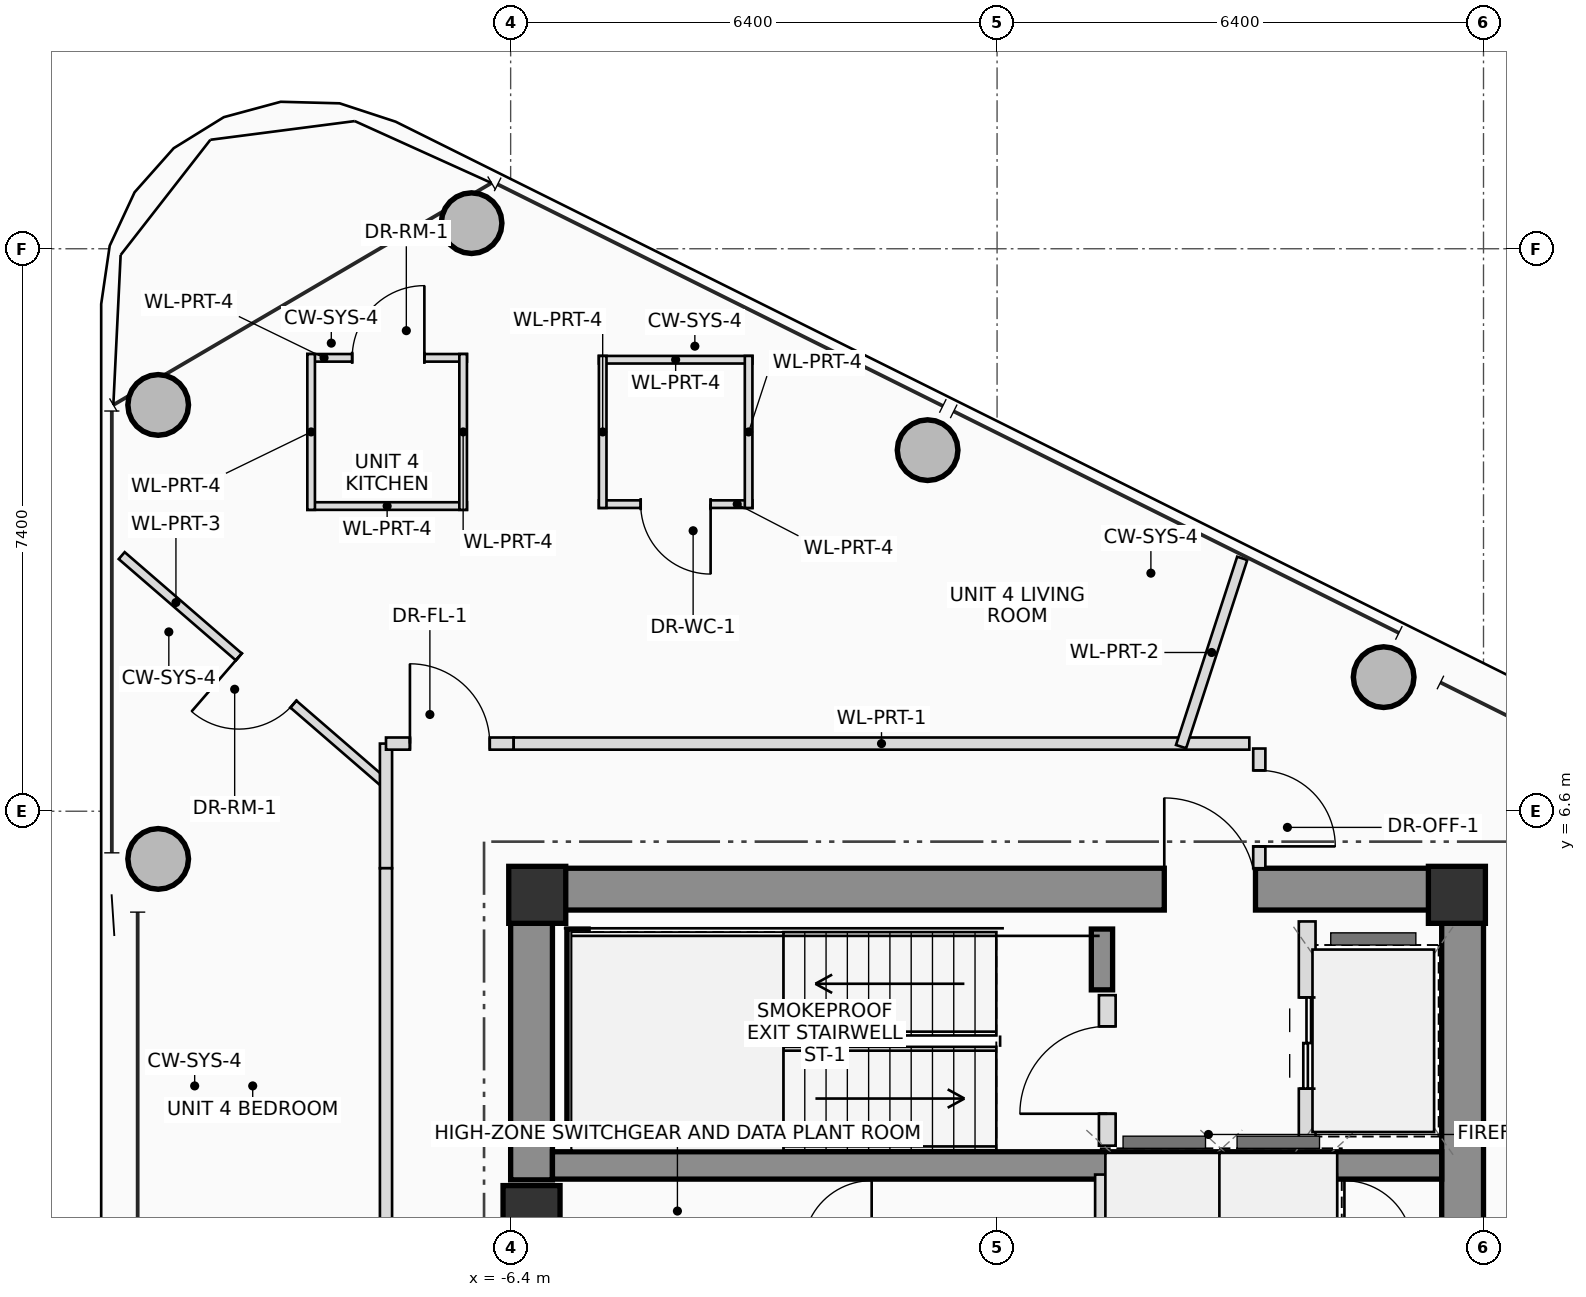
"""IFC4 building model, lengths in metres.
Left out: names, types, materials, properties, quantities, classifications, styles, units other than length and angle.
Written with IfcOpenShell. Run it as: python <this file> out.ifc"""

import sys

from ifc_helpers import new_model, si_unit, direction, frame, frame_2d, origin, origin_2d, place, context, subcontext, project, spatial, rectangle, hollow_circle, extrude, source, transform, mapped, element, fill, save


model = new_model("IFC4")
c1 = context("Model", 3, precision=1e-05, world=origin(), true_north=direction((0.0, 1.0)))
c2 = subcontext(c1, "Body", "Model", "MODEL_VIEW")
j1 = project(units=[si_unit("LENGTHUNIT", "METRE"), si_unit("PLANEANGLEUNIT", "RADIAN")], contexts=[c1])
p1 = place(None, origin())
s1 = spatial("IfcSite", under=j1, at=p1, CompositionType="ELEMENT")
p2 = place(p1, origin())
s2 = spatial("IfcBuilding", under=s1, at=p2, CompositionType="ELEMENT")
p3 = place(p2, frame((0.0, 0.0, 300.2)))
s3 = spatial("IfcBuildingStorey", under=s2, at=p3, CompositionType="ELEMENT", Elevation=300.2)
m1 = source(origin(), c2, "Body", "SweptSolid", [
    extrude(rectangle(XDim=0.75, YDim=0.75, at=origin_2d()), origin(), (0.0, 0.0, 1.0), 3.45),
])
for number, where, z_axis, x_axis in (
    (1, (6.05, 5.5, 0.0), (0.0, 0.0, 1.0), (1.0, 0.0, 0.0)),
    (2, (-6.05, 5.5, 0.0), (0.0, 0.0, 1.0), (1.0, 0.0, 0.0)),
):
    element("IfcColumn", number, at=place(p3, frame(where, z_axis=z_axis, x_axis=x_axis)), inside=s3, PredefinedType="COLUMN", context=c2, shape_type="MappedRepresentation", body=[
        mapped(m1, transform((0.0, 0.0, 0.0), scale=1.0)),
    ])
p4 = place(p3, frame((-6.4, 5.575, 0.0), z_axis=(0.0, 0.0, 1.0), x_axis=(1.0, 0.0, 0.0)))
e3 = element("IfcWall", 3, at=p4, inside=s3, PredefinedType="SHEAR", context=c2, shape_type="SweptSolid", body=[
    extrude(rectangle(XDim=12.8, YDim=0.55, at=frame_2d((6.4, 0.0))), origin(), (0.0, 0.0, 1.0), 3.45),
])
p5 = place(p4, frame((8.6, 0.0, 0.0)))
e4 = element("IfcOpeningElement", 4, at=p5, cuts=e3, PredefinedType="OPENING", context=c2, shape_type="SweptSolid", body=[
    extrude(rectangle(XDim=1.2, YDim=2.2, at=frame_2d((0.6, 1.1))), frame((0.0, 0.285, 0.0), z_axis=(0.0, -1.0, 0.0), x_axis=(1.0, 0.0, 0.0)), (0.0, 0.0, 1.0), 0.57),
])
p6 = place(p3, frame((6.125, -5.3, 0.0), z_axis=(0.0, 0.0, 1.0), x_axis=(0.0, 1.0, 0.0)))
e5 = element("IfcWall", 5, at=p6, inside=s3, PredefinedType="SHEAR", context=c2, shape_type="SweptSolid", body=[
    extrude(rectangle(XDim=10.6, YDim=0.55, at=frame_2d((5.3, 0.0))), origin(), (0.0, 0.0, 1.0), 3.45),
])
p7 = place(p3, frame((-6.125, 1.75, 0.0), z_axis=(0.0, 0.0, 1.0), x_axis=(0.0, 1.0, 0.0)))
e6 = element("IfcWall", 6, at=p7, inside=s3, PredefinedType="SHEAR", context=c2, shape_type="SweptSolid", body=[
    extrude(rectangle(XDim=3.55, YDim=0.55, at=frame_2d((1.775, 0.0))), origin(), (0.0, 0.0, 1.0), 3.45),
])
p8 = place(p3, frame((-5.85, 1.94, 0.0), z_axis=(0.0, 0.0, 1.0), x_axis=(1.0, 0.0, 0.0)))
e7 = element("IfcWall", 7, at=p8, inside=s3, PredefinedType="SHEAR", context=c2, shape_type="SweptSolid", body=[
    extrude(rectangle(XDim=11.7, YDim=0.36, at=frame_2d((5.85, 0.0))), origin(), (0.0, 0.0, 1.0), 3.45),
])
p9 = place(p3, frame((-5.52, 2.3, 0.0), z_axis=(0.0, 0.0, 1.0), x_axis=(0.0, 1.0, 0.0)))
e8 = element("IfcWall", 8, at=p9, inside=s3, PredefinedType="SHEAR", context=c2, shape_type="SweptSolid", body=[
    extrude(rectangle(XDim=2.75, YDim=0.28, at=frame_2d((1.375, 0.0))), origin(), (0.0, 0.0, 1.0), 3.45),
])
p10 = place(p3, frame((1.38, 4.25, 0.0), z_axis=(0.0, 0.0, 1.0), x_axis=(0.0, 1.0, 0.0)))
e9 = element("IfcWall", 9, at=p10, inside=s3, PredefinedType="SHEAR", context=c2, shape_type="SweptSolid", body=[
    extrude(rectangle(XDim=0.8, YDim=0.28, at=frame_2d((0.4, 0.0))), origin(), (0.0, 0.0, 1.0), 3.45),
])
p11 = place(p3, frame((-6.125, 1.3, 0.0), z_axis=(0.0, 0.0, 1.0), x_axis=(1.0, 0.0, 0.0)))
e10 = element("IfcColumn", 10, at=p11, inside=s3, PredefinedType="COLUMN", context=c2, shape_type="MappedRepresentation", body=[
    mapped(m1, transform((0.0, 0.0, 0.0), scale=1.0)),
])
m2 = source(origin(), c2, "Body", "SweptSolid", [
    extrude(hollow_circle(Radius=0.4, WallThickness=0.028, at=origin_2d()), origin(), (0.0, 0.0, 1.0), 3.45),
])
for number, where, z_axis, x_axis in (
    (11, (5.086, 8.364, 0.0), (0.0, 0.0, 1.0), (1.0, 0.0, 0.0)),
    (12, (-0.914, 11.35, 0.0), (0.0, 0.0, 1.0), (1.0, 0.0, 0.0)),
    (13, (-6.914, 14.337, 0.0), (0.0, 0.0, 1.0), (1.0, 0.0, 0.0)),
    (14, (-11.037, 11.945, 0.0), (0.0, 0.0, 1.0), (1.0, 0.0, 0.0)),
    (15, (-11.037, 5.973, 0.0), (0.0, 0.0, 1.0), (1.0, 0.0, 0.0)),
):
    element("IfcColumn", number, at=place(p3, frame(where, z_axis=z_axis, x_axis=x_axis)), inside=s3, PredefinedType="COLUMN", context=c2, shape_type="MappedRepresentation", body=[
        mapped(m2, transform((0.0, 0.0, 0.0), scale=1.0)),
    ])
p12 = place(p3, frame((1.45, 2.2, 0.0), z_axis=(0.0, 0.0, 1.0), x_axis=(0.0, 1.0, 0.0)))
e16 = element("IfcWall", 16, at=p12, inside=s3, PredefinedType="PLUMBINGWALL", context=c2, shape_type="SweptSolid", body=[
    extrude(rectangle(XDim=1.98, YDim=0.22, at=frame_2d((0.99, 0.0))), origin(), (0.0, 0.0, 1.0), 3.25),
])
p13 = place(p12, frame((0.42, 0.0, 0.0)))
e17 = element("IfcOpeningElement", 17, at=p13, cuts=e16, PredefinedType="OPENING", context=c2, shape_type="SweptSolid", body=[
    extrude(rectangle(XDim=1.15, YDim=2.15, at=frame_2d((0.575, 1.075))), frame((0.0, 0.12, 0.0), z_axis=(0.0, -1.0, 0.0), x_axis=(1.0, 0.0, 0.0)), (0.0, 0.0, 1.0), 0.24),
])
p14 = place(p3, frame((4.08, 2.2, 0.0), z_axis=(0.0, 0.0, 1.0), x_axis=(0.0, 1.0, 0.0)))
e18 = element("IfcWall", 18, at=p14, inside=s3, PredefinedType="PLUMBINGWALL", context=c2, shape_type="SweptSolid", body=[
    extrude(rectangle(XDim=2.95, YDim=0.22, at=frame_2d((1.475, 0.0))), origin(), (0.0, 0.0, 1.0), 3.25),
])
p15 = place(p14, frame((0.75, 0.0, 0.0)))
e19 = element("IfcOpeningElement", 19, at=p15, cuts=e18, PredefinedType="OPENING", context=c2, shape_type="SweptSolid", body=[
    extrude(rectangle(XDim=1.2, YDim=2.25, at=frame_2d((0.6, 1.125))), frame((0.0, 0.12, 0.0), z_axis=(0.0, -1.0, 0.0), x_axis=(1.0, 0.0, 0.0)), (0.0, 0.0, 1.0), 0.24),
])
for number, where, z_axis, x_axis in (
    (20, (1.38, 0.84, 0.0), (0.0, 0.0, 1.0), (0.0, 1.0, 0.0)),
    (21, (3.02, 0.84, 0.0), (0.0, 0.0, 1.0), (0.0, 1.0, 0.0)),
    (22, (4.38, 0.84, 0.0), (0.0, 0.0, 1.0), (0.0, 1.0, 0.0)),
):
    element("IfcWall", number, at=place(p3, frame(where, z_axis=z_axis, x_axis=x_axis)), inside=s3, PredefinedType="PLUMBINGWALL", context=c2, shape_type="SweptSolid", body=[
        extrude(rectangle(XDim=0.98, YDim=0.18, at=frame_2d((0.49, 0.0))), origin(), (0.0, 0.0, 1.0), 3.25),
    ])
p16 = place(p3, frame((-8.07, 6.981, 0.0), z_axis=(0.0, 0.0, 1.0), x_axis=(-0.756280799409, 0.654247164644, 0.0)))
e23 = element("IfcWall", 23, at=p16, inside=s3, PredefinedType="PARTITIONING", context=c2, shape_type="SweptSolid", body=[
    extrude(rectangle(XDim=4.558, YDim=0.12, at=frame_2d((2.279, 0.0))), origin(), (0.0, 0.0, 1.0), 2.815),
])
p17 = place(p16, frame((1.571, 0.0, 0.0)))
e24 = element("IfcOpeningElement", 24, at=p17, cuts=e23, PredefinedType="OPENING", context=c2, shape_type="SweptSolid", body=[
    extrude(rectangle(XDim=0.95, YDim=2.1, at=frame_2d((0.475, 1.05))), frame((0.0, 0.07, 0.0), z_axis=(0.0, -1.0, 0.0), x_axis=(1.0, 0.0, 0.0)), (0.0, 0.0, 1.0), 0.14),
])
p18 = place(p3, frame((-5.239, 12.54, 0.0), z_axis=(0.0, 0.0, 1.0), x_axis=(1.0, 0.0, 0.0)))
e25 = element("IfcWall", 25, at=p18, inside=s3, PredefinedType="PARTITIONING", context=c2, shape_type="SweptSolid", body=[
    extrude(rectangle(XDim=2.02, YDim=0.1, at=frame_2d((1.01, 0.0))), origin(), (0.0, 0.0, 1.0), 2.815),
])
p19 = place(p3, frame((-3.219, 10.64, 0.0), z_axis=(0.0, 0.0, 1.0), x_axis=(-1.0, 0.0, 0.0)))
e26 = element("IfcWall", 26, at=p19, inside=s3, PredefinedType="PARTITIONING", context=c2, shape_type="SweptSolid", body=[
    extrude(rectangle(XDim=2.02, YDim=0.1, at=frame_2d((1.01, 0.0))), origin(), (0.0, 0.0, 1.0), 2.905),
])
p20 = place(p19, frame((0.55, 0.0, 0.0)))
e27 = element("IfcOpeningElement", 27, at=p20, cuts=e26, PredefinedType="OPENING", context=c2, shape_type="SweptSolid", body=[
    extrude(rectangle(XDim=0.92, YDim=2.1, at=frame_2d((0.46, 1.05))), frame((0.0, 0.06, 0.0), z_axis=(0.0, -1.0, 0.0), x_axis=(1.0, 0.0, 0.0)), (0.0, 0.0, 1.0), 0.12),
])
p21 = place(p3, frame((-3.269, 12.59, 0.0), z_axis=(0.0, 0.0, 1.0), x_axis=(0.0, -1.0, 0.0)))
e28 = element("IfcWall", 28, at=p21, inside=s3, PredefinedType="PARTITIONING", context=c2, shape_type="SweptSolid", body=[
    extrude(rectangle(XDim=2.0, YDim=0.1, at=frame_2d((1.0, 0.0))), origin(), (0.0, 0.0, 1.0), 2.815),
])
p22 = place(p3, frame((-5.189, 10.59, 0.0), z_axis=(0.0, 0.0, 1.0), x_axis=(0.0, 1.0, 0.0)))
e29 = element("IfcWall", 29, at=p22, inside=s3, PredefinedType="PARTITIONING", context=c2, shape_type="SweptSolid", body=[
    extrude(rectangle(XDim=2.0, YDim=0.1, at=frame_2d((1.0, 0.0))), origin(), (0.0, 0.0, 1.0), 2.905),
])
p23 = place(p3, frame((-9.075, 12.565, 0.0), z_axis=(0.0, 0.0, 1.0), x_axis=(1.0, 0.0, 0.0)))
e30 = element("IfcWall", 30, at=p23, inside=s3, PredefinedType="PARTITIONING", context=c2, shape_type="SweptSolid", body=[
    extrude(rectangle(XDim=2.1, YDim=0.1, at=frame_2d((1.05, 0.0))), origin(), (0.0, 0.0, 1.0), 3.25),
])
p24 = place(p23, frame((0.59, 0.0, 0.0)))
e31 = element("IfcOpeningElement", 31, at=p24, cuts=e30, PredefinedType="OPENING", context=c2, shape_type="SweptSolid", body=[
    extrude(rectangle(XDim=0.95, YDim=2.1, at=frame_2d((0.475, 1.05))), frame((0.0, 0.06, 0.0), z_axis=(0.0, -1.0, 0.0), x_axis=(1.0, 0.0, 0.0)), (0.0, 0.0, 1.0), 0.12),
])
p25 = place(p3, frame((-6.975, 10.615, 0.0), z_axis=(0.0, 0.0, 1.0), x_axis=(-1.0, 0.0, 0.0)))
e32 = element("IfcWall", 32, at=p25, inside=s3, PredefinedType="PARTITIONING", context=c2, shape_type="SweptSolid", body=[
    extrude(rectangle(XDim=2.1, YDim=0.1, at=frame_2d((1.05, 0.0))), origin(), (0.0, 0.0, 1.0), 2.905),
])
p26 = place(p3, frame((-7.025, 12.615, 0.0), z_axis=(0.0, 0.0, 1.0), x_axis=(0.0, -1.0, 0.0)))
e33 = element("IfcWall", 33, at=p26, inside=s3, PredefinedType="PARTITIONING", context=c2, shape_type="SweptSolid", body=[
    extrude(rectangle(XDim=2.05, YDim=0.1, at=frame_2d((1.025, 0.0))), origin(), (0.0, 0.0, 1.0), 2.905),
])
p27 = place(p3, frame((-9.025, 10.565, 0.0), z_axis=(0.0, 0.0, 1.0), x_axis=(0.0, 1.0, 0.0)))
e34 = element("IfcWall", 34, at=p27, inside=s3, PredefinedType="PARTITIONING", context=c2, shape_type="SweptSolid", body=[
    extrude(rectangle(XDim=2.05, YDim=0.1, at=frame_2d((1.025, 0.0))), origin(), (0.0, 0.0, 1.0), 3.25),
])
p28 = place(p3, frame((-8.04, 5.85, 0.0), z_axis=(0.0, 0.0, 1.0), x_axis=(0.0, 1.0, 0.0)))
e35 = element("IfcWall", 35, at=p28, inside=s3, PredefinedType="PARTITIONING", context=c2, shape_type="SweptSolid", body=[
    extrude(rectangle(XDim=1.64, YDim=0.16, at=frame_2d((0.82, 0.0))), origin(), (0.0, 0.0, 1.0), 2.905),
])
p29 = place(p3, frame((-8.04, 7.49, 0.0), z_axis=(0.0, 0.0, 1.0), x_axis=(1.0, 0.0, 0.0)))
e36 = element("IfcWall", 36, at=p29, inside=s3, PredefinedType="PARTITIONING", context=c2, shape_type="SweptSolid", body=[
    extrude(rectangle(XDim=1.68, YDim=0.16, at=frame_2d((0.84, 0.0))), origin(), (0.0, 0.0, 1.0), 2.655),
])
p30 = place(p29, frame((0.315, 0.0, 0.0)))
e37 = element("IfcOpeningElement", 37, at=p30, cuts=e36, PredefinedType="OPENING", context=c2, shape_type="SweptSolid", body=[
    extrude(rectangle(XDim=1.05, YDim=2.2, at=frame_2d((0.525, 1.1))), frame((0.0, 0.09, 0.0), z_axis=(0.0, -1.0, 0.0), x_axis=(1.0, 0.0, 0.0)), (0.0, 0.0, 1.0), 0.18),
])
p31 = place(p3, frame((-6.36, 7.49, 0.0), z_axis=(0.0, 0.0, 1.0), x_axis=(1.0, 0.0, 0.0)))
e38 = element("IfcWall", 38, at=p31, inside=s3, PredefinedType="PARTITIONING", context=c2, shape_type="SweptSolid", body=[
    extrude(rectangle(XDim=9.679, YDim=0.16, at=frame_2d((4.84, 0.0))), origin(), (0.0, 0.0, 1.0), 2.655),
])
p32 = place(p3, frame((3.45, 7.425, 0.0), z_axis=(0.0, 0.0, 1.0), x_axis=(0.0, -1.0, 0.0)))
e39 = element("IfcWall", 39, at=p32, inside=s3, PredefinedType="PARTITIONING", context=c2, shape_type="SweptSolid", body=[
    extrude(rectangle(XDim=1.575, YDim=0.16, at=frame_2d((0.787, 0.0))), origin(), (0.0, 0.0, 1.0), 2.855),
])
p33 = place(p32, frame((0.287, 0.0, 0.0)))
e40 = element("IfcOpeningElement", 40, at=p33, cuts=e39, PredefinedType="OPENING", context=c2, shape_type="SweptSolid", body=[
    extrude(rectangle(XDim=1.0, YDim=2.25, at=frame_2d((0.5, 1.125))), frame((0.0, 0.09, 0.0), z_axis=(0.0, -1.0, 0.0), x_axis=(1.0, 0.0, 0.0)), (0.0, 0.0, 1.0), 0.18),
])
p34 = place(p3, frame((-8.04, -5.85, 0.0), z_axis=(0.0, 0.0, 1.0), x_axis=(0.0, 1.0, 0.0)))
e41 = element("IfcWall", 41, at=p34, inside=s3, PredefinedType="PARTITIONING", context=c2, shape_type="SweptSolid", body=[
    extrude(rectangle(XDim=11.7, YDim=0.16, at=frame_2d((5.85, 0.0))), origin(), (0.0, 0.0, 1.0), 2.655),
])
p35 = place(p3, frame((2.421, 7.45, 0.0), z_axis=(0.0, 0.0, 1.0), x_axis=(0.309047920595, 0.951046467201, 0.0)))
e42 = element("IfcWall", 42, at=p35, inside=s3, PredefinedType="PARTITIONING", context=c2, shape_type="SweptSolid", body=[
    extrude(rectangle(XDim=2.604, YDim=0.14, at=frame_2d((1.302, 0.0))), origin(), (0.0, 0.0, 1.0), 2.815),
])
p36 = place(p5, origin())
e43 = element("IfcDoor", 43, at=p36, inside=s3, OperationType="SINGLE_SWING_LEFT", PredefinedType="DOOR", context=c2, shape_type="SweptSolid", body=[
    extrude(rectangle(XDim=1.2, YDim=2.2, at=frame_2d((0.6, 1.1))), frame((0.0, 0.025, 0.0), z_axis=(0.0, -1.0, 0.0), x_axis=(1.0, 0.0, 0.0)), (0.0, 0.0, 1.0), 0.05),
])
fill(e4, e43)
p37 = place(p13, origin())
e44 = element("IfcDoor", 44, at=p37, inside=s3, OperationType="SINGLE_SWING_LEFT", PredefinedType="DOOR", context=c2, shape_type="SweptSolid", body=[
    extrude(rectangle(XDim=1.15, YDim=2.15, at=frame_2d((0.575, 1.075))), frame((0.0, 0.025, 0.0), z_axis=(0.0, -1.0, 0.0), x_axis=(1.0, 0.0, 0.0)), (0.0, 0.0, 1.0), 0.05),
])
fill(e17, e44)
p38 = place(p15, origin())
e45 = element("IfcDoor", 45, at=p38, inside=s3, OperationType="DOUBLE_DOOR_SLIDING", PredefinedType="DOOR", context=c2, shape_type="SweptSolid", body=[
    extrude(rectangle(XDim=1.2, YDim=2.25, at=frame_2d((0.6, 1.125))), frame((0.0, 0.025, 0.0), z_axis=(0.0, -1.0, 0.0), x_axis=(1.0, 0.0, 0.0)), (0.0, 0.0, 1.0), 0.05),
])
fill(e19, e45)
p39 = place(p17, origin())
e46 = element("IfcDoor", 46, at=p39, inside=s3, OperationType="SINGLE_SWING_RIGHT", PredefinedType="DOOR", context=c2, shape_type="SweptSolid", body=[
    extrude(rectangle(XDim=0.95, YDim=2.1, at=frame_2d((0.475, 1.05))), frame((0.0, 0.025, 0.0), z_axis=(0.0, -1.0, 0.0), x_axis=(1.0, 0.0, 0.0)), (0.0, 0.0, 1.0), 0.05),
])
fill(e24, e46)
p40 = place(p20, origin())
e47 = element("IfcDoor", 47, at=p40, inside=s3, OperationType="SINGLE_SWING_LEFT", PredefinedType="DOOR", context=c2, shape_type="SweptSolid", body=[
    extrude(rectangle(XDim=0.92, YDim=2.1, at=frame_2d((0.46, 1.05))), frame((0.0, 0.025, 0.0), z_axis=(0.0, -1.0, 0.0), x_axis=(1.0, 0.0, 0.0)), (0.0, 0.0, 1.0), 0.05),
])
fill(e27, e47)
p41 = place(p24, origin())
e48 = element("IfcDoor", 48, at=p41, inside=s3, OperationType="SINGLE_SWING_RIGHT", PredefinedType="DOOR", context=c2, shape_type="SweptSolid", body=[
    extrude(rectangle(XDim=0.95, YDim=2.1, at=frame_2d((0.475, 1.05))), frame((0.0, 0.025, 0.0), z_axis=(0.0, -1.0, 0.0), x_axis=(1.0, 0.0, 0.0)), (0.0, 0.0, 1.0), 0.05),
])
fill(e31, e48)
p42 = place(p30, origin())
e49 = element("IfcDoor", 49, at=p42, inside=s3, OperationType="SINGLE_SWING_LEFT", PredefinedType="DOOR", context=c2, shape_type="SweptSolid", body=[
    extrude(rectangle(XDim=1.05, YDim=2.2, at=frame_2d((0.525, 1.1))), frame((0.0, 0.025, 0.0), z_axis=(0.0, -1.0, 0.0), x_axis=(1.0, 0.0, 0.0)), (0.0, 0.0, 1.0), 0.05),
])
fill(e37, e49)
p43 = place(p33, origin())
e50 = element("IfcDoor", 50, at=p43, inside=s3, OperationType="SINGLE_SWING_RIGHT", PredefinedType="DOOR", context=c2, shape_type="SweptSolid", body=[
    extrude(rectangle(XDim=1.0, YDim=2.25, at=frame_2d((0.5, 1.125))), frame((0.0, 0.025, 0.0), z_axis=(0.0, -1.0, 0.0), x_axis=(1.0, 0.0, 0.0)), (0.0, 0.0, 1.0), 0.05),
])
fill(e40, e50)
save(model, sys.argv[1])
